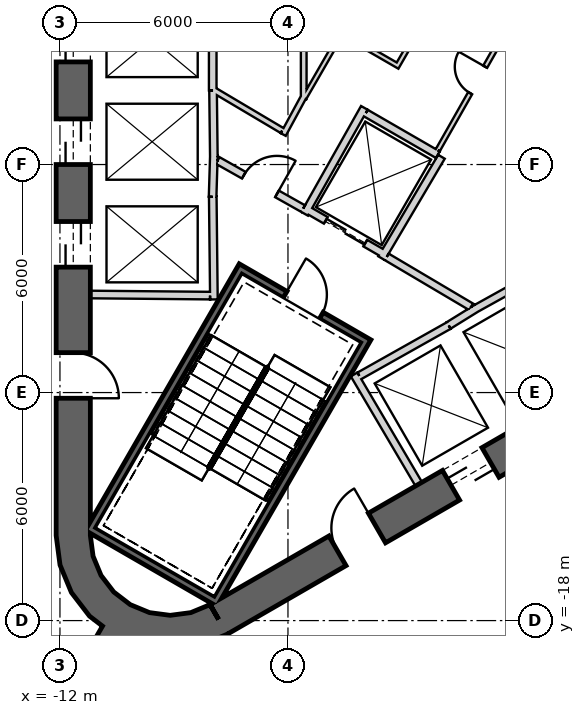
"""IFC4 building model, lengths in metres.
Left out: names, types, materials, properties, quantities, classifications, styles, units other than length and angle.
Written with IfcOpenShell. Run it as: python <this file> out.ifc"""

import sys

from ifc_helpers import new_model, si_unit, direction, frame, frame_2d, origin, place, context, subcontext, project, spatial, polyline, rectangle, outline, extrude, element, fill, save


model = new_model("IFC4")
c1 = context("Model", 3, precision=1e-05, world=origin(), true_north=direction((0.0, 1.0)))
c2 = subcontext(c1, "Body", "Model", "MODEL_VIEW")
j1 = project(units=[si_unit("LENGTHUNIT", "METRE"), si_unit("PLANEANGLEUNIT", "RADIAN")], contexts=[c1])
p1 = place(None, origin())
s1 = spatial("IfcSite", under=j1, at=p1, CompositionType="ELEMENT")
p2 = place(p1, origin())
s2 = spatial("IfcBuilding", under=s1, at=p2, CompositionType="ELEMENT")
p3 = place(p2, frame((0.0, 0.0, 277.2)))
s3 = spatial("IfcBuildingStorey", under=s2, at=p3, CompositionType="ELEMENT", Elevation=277.2)
p4 = place(p3, frame((-11.65, 15.762, 0.0), z_axis=(0.0, 0.0, 1.0), x_axis=(0.0, -1.0, 0.0)))
e1 = element("IfcWall", 1, at=p4, inside=s3, PredefinedType="SHEAR", context=c2, shape_type="SweptSolid", body=[
    extrude(rectangle(XDim=31.523, YDim=0.9, at=frame_2d((15.762, 0.0))), origin(), (0.0, 0.0, 1.0), 6.5),
])
p5 = place(p4, frame((7.062, 0.0, 0.0)))
e2 = element("IfcOpeningElement", 2, at=p5, cuts=e1, PredefinedType="OPENING", context=c2, shape_type="SweptSolid", body=[
    extrude(rectangle(XDim=1.2, YDim=2.4, at=frame_2d((0.6, 1.2))), frame((0.0, 0.46, 0.0), z_axis=(0.0, -1.0, 0.0), x_axis=(1.0, 0.0, 0.0)), (0.0, 0.0, 1.0), 0.92),
])
p6 = place(p4, frame((9.762, 0.0, 0.0)))
e3 = element("IfcOpeningElement", 3, at=p6, cuts=e1, PredefinedType="OPENING", context=c2, shape_type="SweptSolid", body=[
    extrude(rectangle(XDim=1.2, YDim=2.4, at=frame_2d((0.6, 1.2))), frame((0.0, 0.46, 0.0), z_axis=(0.0, -1.0, 0.0), x_axis=(1.0, 0.0, 0.0)), (0.0, 0.0, 1.0), 0.92),
])
p7 = place(p4, frame((12.462, 0.0, 0.0)))
e4 = element("IfcOpeningElement", 4, at=p7, cuts=e1, PredefinedType="OPENING", context=c2, shape_type="SweptSolid", body=[
    extrude(rectangle(XDim=1.2, YDim=2.4, at=frame_2d((0.6, 1.2))), frame((0.0, 0.46, 0.0), z_axis=(0.0, -1.0, 0.0), x_axis=(1.0, 0.0, 0.0)), (0.0, 0.0, 1.0), 0.92),
])
p8 = place(p4, frame((15.162, 0.0, 0.0)))
e5 = element("IfcOpeningElement", 5, at=p8, cuts=e1, PredefinedType="OPENING", context=c2, shape_type="SweptSolid", body=[
    extrude(rectangle(XDim=1.2, YDim=2.4, at=frame_2d((0.6, 1.2))), frame((0.0, 0.46, 0.0), z_axis=(0.0, -1.0, 0.0), x_axis=(1.0, 0.0, 0.0)), (0.0, 0.0, 1.0), 0.92),
])
p9 = place(p4, frame((17.862, 0.0, 0.0)))
e6 = element("IfcOpeningElement", 6, at=p9, cuts=e1, PredefinedType="OPENING", context=c2, shape_type="SweptSolid", body=[
    extrude(rectangle(XDim=1.2, YDim=2.4, at=frame_2d((0.6, 1.2))), frame((0.0, 0.46, 0.0), z_axis=(0.0, -1.0, 0.0), x_axis=(1.0, 0.0, 0.0)), (0.0, 0.0, 1.0), 0.92),
])
p10 = place(p4, frame((20.562, 0.0, 0.0)))
e7 = element("IfcOpeningElement", 7, at=p10, cuts=e1, PredefinedType="OPENING", context=c2, shape_type="SweptSolid", body=[
    extrude(rectangle(XDim=1.2, YDim=2.4, at=frame_2d((0.6, 1.2))), frame((0.0, 0.46, 0.0), z_axis=(0.0, -1.0, 0.0), x_axis=(1.0, 0.0, 0.0)), (0.0, 0.0, 1.0), 0.92),
])
p11 = place(p4, frame((23.262, 0.0, 0.0)))
e8 = element("IfcOpeningElement", 8, at=p11, cuts=e1, PredefinedType="OPENING", context=c2, shape_type="SweptSolid", body=[
    extrude(rectangle(XDim=1.2, YDim=2.4, at=frame_2d((0.6, 1.2))), frame((0.0, 0.46, 0.0), z_axis=(0.0, -1.0, 0.0), x_axis=(1.0, 0.0, 0.0)), (0.0, 0.0, 1.0), 0.92),
])
p12 = place(p4, frame((3.612, 0.0, 0.0)))
e9 = element("IfcOpeningElement", 9, at=p12, cuts=e1, PredefinedType="OPENING", context=c2, shape_type="SweptSolid", body=[
    extrude(rectangle(XDim=1.2, YDim=2.4, at=frame_2d((0.6, 1.2))), frame((0.0, 0.46, 0.0), z_axis=(0.0, -1.0, 0.0), x_axis=(1.0, 0.0, 0.0)), (0.0, 0.0, 1.0), 0.92),
])
p13 = place(p4, frame((26.712, 0.0, 0.0)))
e10 = element("IfcOpeningElement", 10, at=p13, cuts=e1, PredefinedType="OPENING", context=c2, shape_type="SweptSolid", body=[
    extrude(rectangle(XDim=1.2, YDim=2.4, at=frame_2d((0.6, 1.2))), frame((0.0, 0.46, 0.0), z_axis=(0.0, -1.0, 0.0), x_axis=(1.0, 0.0, 0.0)), (0.0, 0.0, 1.0), 0.92),
])
p14 = place(p3, frame((-7.825, -17.97, 0.0), z_axis=(0.0, 0.0, 1.0), x_axis=(0.866028369851, 0.499994862586, 0.0)))
e11 = element("IfcWall", 11, at=p14, inside=s3, PredefinedType="SHEAR", context=c2, shape_type="SweptSolid", body=[
    extrude(rectangle(XDim=31.523, YDim=0.9, at=frame_2d((15.762, 0.0))), origin(), (0.0, 0.0, 1.0), 6.5),
])
p15 = place(p14, frame((7.062, 0.0, 0.0)))
e12 = element("IfcOpeningElement", 12, at=p15, cuts=e11, PredefinedType="OPENING", context=c2, shape_type="SweptSolid", body=[
    extrude(rectangle(XDim=1.2, YDim=2.4, at=frame_2d((0.6, 1.2))), frame((0.0, 0.46, 0.0), z_axis=(0.0, -1.0, 0.0), x_axis=(1.0, 0.0, 0.0)), (0.0, 0.0, 1.0), 0.92),
])
p16 = place(p14, frame((9.762, 0.0, 0.0)))
e13 = element("IfcOpeningElement", 13, at=p16, cuts=e11, PredefinedType="OPENING", context=c2, shape_type="SweptSolid", body=[
    extrude(rectangle(XDim=1.2, YDim=2.4, at=frame_2d((0.6, 1.2))), frame((0.0, 0.46, 0.0), z_axis=(0.0, -1.0, 0.0), x_axis=(1.0, 0.0, 0.0)), (0.0, 0.0, 1.0), 0.92),
])
p17 = place(p14, frame((12.462, 0.0, 0.0)))
e14 = element("IfcOpeningElement", 14, at=p17, cuts=e11, PredefinedType="OPENING", context=c2, shape_type="SweptSolid", body=[
    extrude(rectangle(XDim=1.2, YDim=2.4, at=frame_2d((0.6, 1.2))), frame((0.0, 0.46, 0.0), z_axis=(0.0, -1.0, 0.0), x_axis=(1.0, 0.0, 0.0)), (0.0, 0.0, 1.0), 0.92),
])
p18 = place(p14, frame((15.162, 0.0, 0.0)))
e15 = element("IfcOpeningElement", 15, at=p18, cuts=e11, PredefinedType="OPENING", context=c2, shape_type="SweptSolid", body=[
    extrude(rectangle(XDim=1.2, YDim=2.4, at=frame_2d((0.6, 1.2))), frame((0.0, 0.46, 0.0), z_axis=(0.0, -1.0, 0.0), x_axis=(1.0, 0.0, 0.0)), (0.0, 0.0, 1.0), 0.92),
])
p19 = place(p14, frame((17.862, 0.0, 0.0)))
e16 = element("IfcOpeningElement", 16, at=p19, cuts=e11, PredefinedType="OPENING", context=c2, shape_type="SweptSolid", body=[
    extrude(rectangle(XDim=1.2, YDim=2.4, at=frame_2d((0.6, 1.2))), frame((0.0, 0.46, 0.0), z_axis=(0.0, -1.0, 0.0), x_axis=(1.0, 0.0, 0.0)), (0.0, 0.0, 1.0), 0.92),
])
p20 = place(p14, frame((20.562, 0.0, 0.0)))
e17 = element("IfcOpeningElement", 17, at=p20, cuts=e11, PredefinedType="OPENING", context=c2, shape_type="SweptSolid", body=[
    extrude(rectangle(XDim=1.2, YDim=2.4, at=frame_2d((0.6, 1.2))), frame((0.0, 0.46, 0.0), z_axis=(0.0, -1.0, 0.0), x_axis=(1.0, 0.0, 0.0)), (0.0, 0.0, 1.0), 0.92),
])
p21 = place(p14, frame((26.712, 0.0, 0.0)))
e18 = element("IfcOpeningElement", 18, at=p21, cuts=e11, PredefinedType="OPENING", context=c2, shape_type="SweptSolid", body=[
    extrude(rectangle(XDim=1.2, YDim=2.4, at=frame_2d((0.6, 1.2))), frame((0.0, 0.46, 0.0), z_axis=(0.0, -1.0, 0.0), x_axis=(1.0, 0.0, 0.0)), (0.0, 0.0, 1.0), 0.92),
])
p22 = place(p14, frame((3.612, 0.0, 0.0)))
e19 = element("IfcOpeningElement", 19, at=p22, cuts=e11, PredefinedType="OPENING", context=c2, shape_type="SweptSolid", body=[
    extrude(rectangle(XDim=1.2, YDim=2.4, at=frame_2d((0.6, 1.2))), frame((0.0, 0.46, 0.0), z_axis=(0.0, -1.0, 0.0), x_axis=(1.0, 0.0, 0.0)), (0.0, 0.0, 1.0), 0.92),
])
p23 = place(p3, origin())
e20 = element("IfcWall", 20, at=p23, inside=s3, PredefinedType="SHEAR", context=c2, shape_type="SweptSolid", body=[
    extrude(outline(polyline([(-12.1, -15.762), (-11.998, -16.538), (-11.698, -17.262), (-11.221, -17.883), (-10.6, -18.36), (-9.876, -18.659), (-9.1, -18.762), (-8.323, -18.659), (-7.6, -18.36), (-8.05, -17.58), (-8.556, -17.79), (-9.1, -17.862), (-9.644, -17.79), (-10.15, -17.58), (-10.585, -17.247), (-10.919, -16.812), (-11.128, -16.305), (-11.2, -15.762), (-12.1, -15.762)])), origin(), (0.0, 0.0, 1.0), 6.5),
])
p24 = place(p3, frame((-10.575, -18.316, 0.0), z_axis=(0.0, 0.0, 1.0), x_axis=(-0.500007350791, -0.866021159762, 0.0)))
e21 = element("IfcWall", 21, at=p24, inside=s3, PredefinedType="SHEAR", context=c2, shape_type="SweptSolid", body=[
    extrude(rectangle(XDim=9.965, YDim=0.7, at=frame_2d((4.982, 0.0))), origin(), (0.0, 0.0, 1.0), 6.5),
])
p25 = place(p24, frame((2.05, 0.0, 0.0)))
e22 = element("IfcOpeningElement", 22, at=p25, cuts=e21, PredefinedType="OPENING", context=c2, shape_type="SweptSolid", body=[
    extrude(rectangle(XDim=1.4, YDim=2.4, at=frame_2d((0.7, 1.2))), frame((0.0, 0.36, 0.0), z_axis=(0.0, -1.0, 0.0), x_axis=(1.0, 0.0, 0.0)), (0.0, 0.0, 1.0), 0.72),
])
p26 = place(p3, frame((-7.98, 4.05, 0.0), z_axis=(0.0, 0.0, 1.0), x_axis=(0.0, -1.0, 0.0)))
e23 = element("IfcWall", 23, at=p26, inside=s3, PredefinedType="PLUMBINGWALL", context=c2, shape_type="SweptSolid", body=[
    extrude(rectangle(XDim=8.1, YDim=0.2, at=frame_2d((4.05, 0.0))), origin(), (0.0, 0.0, 1.0), 6.1),
])
p27 = place(p3, frame((-7.95, -5.772, 0.0), z_axis=(0.0, 0.0, 1.0), x_axis=(-0.030803413295, -0.999525462272, 0.0)))
e24 = element("IfcWall", 24, at=p27, inside=s3, PredefinedType="PLUMBINGWALL", context=c2, shape_type="SweptSolid", body=[
    extrude(rectangle(XDim=1.078, YDim=0.2, at=frame_2d((0.539, 0.0))), origin(), (0.0, 0.0, 1.0), 6.1),
])
p28 = place(p3, frame((-7.971, -4.05, 0.0), z_axis=(0.0, 0.0, 1.0), x_axis=(0.012042535896, -0.999927486035, 0.0)))
e25 = element("IfcWall", 25, at=p28, inside=s3, PredefinedType="PLUMBINGWALL", context=c2, shape_type="SweptSolid", body=[
    extrude(rectangle(XDim=1.845, YDim=0.2, at=frame_2d((0.922, 0.0))), origin(), (0.0, 0.0, 1.0), 6.1),
])
p29 = place(p3, frame((-7.979, -6.85, 0.0), z_axis=(0.0, 0.0, 1.0), x_axis=(0.011121475088, -0.999938154483, 0.0)))
e26 = element("IfcWall", 26, at=p29, inside=s3, PredefinedType="PLUMBINGWALL", context=c2, shape_type="SweptSolid", body=[
    extrude(rectangle(XDim=2.7, YDim=0.2, at=frame_2d((1.35, 0.0))), origin(), (0.0, 0.0, 1.0), 6.1),
])
p30 = place(p3, frame((-8.05, -9.449, 0.0), z_axis=(0.0, 0.0, 1.0), x_axis=(-0.999957467379, 0.009222983926, 0.0)))
e27 = element("IfcWall", 27, at=p30, inside=s3, PredefinedType="PLUMBINGWALL", context=c2, shape_type="SweptSolid", body=[
    extrude(rectangle(XDim=3.15, YDim=0.2, at=frame_2d((1.575, 0.0))), origin(), (0.0, 0.0, 1.0), 6.1),
])
p31 = place(p3, frame((-2.558, -14.409, 0.0), z_axis=(0.0, 0.0, 1.0), x_axis=(-0.507997497166, 0.861358544901, 0.0)))
e28 = element("IfcWall", 28, at=p31, inside=s3, PredefinedType="PLUMBINGWALL", context=c2, shape_type="SweptSolid", body=[
    extrude(rectangle(XDim=3.35, YDim=0.2, at=frame_2d((1.675, 0.0))), origin(), (0.0, 0.0, 1.0), 6.1),
])
p32 = place(p3, frame((-1.769, -10.237, 0.0), z_axis=(0.0, 0.0, 1.0), x_axis=(-0.871534483978, -0.490334215854, 0.0)))
e29 = element("IfcWall", 29, at=p32, inside=s3, PredefinedType="PLUMBINGWALL", context=c2, shape_type="SweptSolid", body=[
    extrude(rectangle(XDim=2.7, YDim=0.2, at=frame_2d((1.35, 0.0))), origin(), (0.0, 0.0, 1.0), 6.1),
])
p33 = place(p3, frame((-1.024, -9.771, 0.0), z_axis=(0.0, 0.0, 1.0), x_axis=(-0.850348075135, -0.526220629693, 0.0)))
e30 = element("IfcWall", 30, at=p33, inside=s3, PredefinedType="PLUMBINGWALL", context=c2, shape_type="SweptSolid", body=[
    extrude(rectangle(XDim=0.878, YDim=0.2, at=frame_2d((0.439, 0.0))), origin(), (0.0, 0.0, 1.0), 6.1),
])
p34 = place(p3, frame((-1.13, -9.831, 0.0), z_axis=(0.0, 0.0, 1.0), x_axis=(0.874269620932, 0.485440655401, 0.0)))
e31 = element("IfcWall", 31, at=p34, inside=s3, PredefinedType="PLUMBINGWALL", context=c2, shape_type="SweptSolid", body=[
    extrude(rectangle(XDim=1.845, YDim=0.2, at=frame_2d((0.922, 0.0))), origin(), (0.0, 0.0, 1.0), 6.1),
])
p35 = place(p3, frame((-3.905, -10.563, -0.35), z_axis=(0.0, 0.0, 1.0), x_axis=(-0.500012932018, -0.866017937352, 0.0)))
e32 = element("IfcWall", 32, at=p35, inside=s3, PredefinedType="SHEAR", context=c2, shape_type="SweptSolid", body=[
    extrude(rectangle(XDim=8.1, YDim=0.2, at=frame_2d((4.05, 0.0))), origin(), (0.0, 0.0, 1.0), 6.45),
])
p36 = place(p3, frame((-11.282, -15.541, -0.35), z_axis=(0.0, 0.0, 1.0), x_axis=(0.866000483506, -0.500043160704, 0.0)))
e33 = element("IfcWall", 33, at=p36, inside=s3, PredefinedType="SHEAR", context=c2, shape_type="SweptSolid", body=[
    extrude(rectangle(XDim=3.8, YDim=0.2, at=frame_2d((1.9, 0.0))), origin(), (0.0, 0.0, 1.0), 6.45),
])
p37 = place(p3, frame((-7.196, -8.663, -0.35), z_axis=(0.0, 0.0, 1.0), x_axis=(-0.499997992926, -0.866026562566, 0.0)))
e34 = element("IfcWall", 34, at=p37, inside=s3, PredefinedType="SHEAR", context=c2, shape_type="SweptSolid", body=[
    extrude(rectangle(XDim=7.9, YDim=0.2, at=frame_2d((3.95, 0.0))), origin(), (0.0, 0.0, 1.0), 6.45),
])
p38 = place(p3, frame((-4.041, -10.599, -0.35), z_axis=(0.0, 0.0, 1.0), x_axis=(-0.866047807691, 0.499961193289, 0.0)))
e35 = element("IfcWall", 35, at=p38, inside=s3, PredefinedType="SHEAR", context=c2, shape_type="SweptSolid", body=[
    extrude(rectangle(XDim=3.6, YDim=0.2, at=frame_2d((1.8, 0.0))), origin(), (0.0, 0.0, 1.0), 6.45),
])
p39 = place(p38, frame((1.25, 0.0, 0.35)))
e36 = element("IfcOpeningElement", 36, at=p39, cuts=e35, PredefinedType="OPENING", context=c2, shape_type="SweptSolid", body=[
    extrude(rectangle(XDim=1.1, YDim=2.1, at=frame_2d((0.55, 1.05))), frame((0.0, 0.11, 0.0), z_axis=(0.0, -1.0, 0.0), x_axis=(1.0, 0.0, 0.0)), (0.0, 0.0, 1.0), 0.22),
])
p40 = place(p3, frame((-3.446, -8.368, 0.0), z_axis=(0.0, 0.0, 1.0), x_axis=(-0.866024647952, 0.500001309137, 0.0)))
e37 = element("IfcWall", 37, at=p40, inside=s3, PredefinedType="PLUMBINGWALL", context=c2, shape_type="SweptSolid", body=[
    extrude(rectangle(XDim=2.4, YDim=0.2, at=frame_2d((1.2, 0.0))), origin(), (0.0, 0.0, 1.0), 6.1),
])
p41 = place(p40, frame((0.6, 0.0, 0.0)))
e38 = element("IfcOpeningElement", 38, at=p41, cuts=e37, PredefinedType="OPENING", context=c2, shape_type="SweptSolid", body=[
    extrude(rectangle(XDim=1.2, YDim=2.4, at=frame_2d((0.6, 1.2))), frame((0.0, 0.11, 0.0), z_axis=(0.0, -1.0, 0.0), x_axis=(1.0, 0.0, 0.0)), (0.0, 0.0, 1.0), 0.22),
])
p42 = place(p3, frame((-1.961, -5.796, 0.0), z_axis=(0.0, 0.0, 1.0), x_axis=(-0.508647062354, -0.860975125052, 0.0)))
e39 = element("IfcWall", 39, at=p42, inside=s3, PredefinedType="PLUMBINGWALL", context=c2, shape_type="SweptSolid", body=[
    extrude(rectangle(XDim=3.1, YDim=0.2, at=frame_2d((1.55, 0.0))), origin(), (0.0, 0.0, 1.0), 6.1),
])
p43 = place(p3, frame((-3.99, -4.509, 0.0), z_axis=(0.0, 0.0, 1.0), x_axis=(-0.491358283181, -0.870957540612, 0.0)))
e40 = element("IfcWall", 40, at=p43, inside=s3, PredefinedType="PLUMBINGWALL", context=c2, shape_type="SweptSolid", body=[
    extrude(rectangle(XDim=3.2, YDim=0.2, at=frame_2d((1.6, 0.0))), origin(), (0.0, 0.0, 1.0), 6.1),
])
p44 = place(p3, frame((-3.953, -4.646, 0.0), z_axis=(0.0, 0.0, 1.0), x_axis=(0.866038900241, -0.499976622722, 0.0)))
e41 = element("IfcWall", 41, at=p44, inside=s3, PredefinedType="PLUMBINGWALL", context=c2, shape_type="SweptSolid", body=[
    extrude(rectangle(XDim=2.189, YDim=0.2, at=frame_2d((1.095, 0.0))), origin(), (0.0, 0.0, 1.0), 6.1),
])
p45 = place(p3, frame((-3.401, -8.43, 0.0), z_axis=(0.0, 0.0, 1.0), x_axis=(0.860615607571, -0.509255118781, 0.0)))
e42 = element("IfcWall", 42, at=p45, inside=s3, PredefinedType="PARTITIONING", context=c2, shape_type="SweptSolid", body=[
    extrude(rectangle(XDim=2.581, YDim=0.2, at=frame_2d((1.29, 0.0))), origin(), (0.0, 0.0, 1.0), 6.1),
])
p46 = place(p3, frame((-7.849, -5.894, 0.0), z_axis=(0.0, 0.0, 1.0), x_axis=(0.871363259478, -0.490638431059, 0.0)))
e43 = element("IfcWall", 43, at=p46, inside=s3, PredefinedType="PARTITIONING", context=c2, shape_type="SweptSolid", body=[
    extrude(rectangle(XDim=2.581, YDim=0.2, at=frame_2d((1.291, 0.0))), origin(), (0.0, 0.0, 1.0), 6.1),
])
p47 = place(p46, frame((0.791, 0.0, 0.0)))
e44 = element("IfcOpeningElement", 44, at=p47, cuts=e43, PredefinedType="OPENING", context=c2, shape_type="SweptSolid", body=[
    extrude(rectangle(XDim=1.0, YDim=2.1, at=frame_2d((0.5, 1.05))), frame((0.0, 0.11, 0.0), z_axis=(0.0, -1.0, 0.0), x_axis=(1.0, 0.0, 0.0)), (0.0, 0.0, 1.0), 0.22),
])
p48 = place(p3, frame((0.094, -1.836, 0.0), z_axis=(0.0, 0.0, 1.0), x_axis=(-0.494097972448, -0.869406230495, 0.0)))
e45 = element("IfcWall", 45, at=p48, inside=s3, PredefinedType="PARTITIONING", context=c2, shape_type="SweptSolid", body=[
    extrude(rectangle(XDim=4.357, YDim=0.12, at=frame_2d((2.179, 0.0))), origin(), (0.0, 0.0, 1.0), 6.1),
])
p49 = place(p48, frame((1.83, 0.0, 0.0)))
e46 = element("IfcOpeningElement", 46, at=p49, cuts=e45, PredefinedType="OPENING", context=c2, shape_type="SweptSolid", body=[
    extrude(rectangle(XDim=0.8, YDim=2.1, at=frame_2d((0.4, 1.05))), frame((0.0, 0.07, 0.0), z_axis=(0.0, -1.0, 0.0), x_axis=(1.0, 0.0, 0.0)), (0.0, 0.0, 1.0), 0.14),
])
p50 = place(p3, frame((-5.586, -4.275, 0.0), z_axis=(0.0, 0.0, 1.0), x_axis=(0.0, 1.0, 0.0)))
e47 = element("IfcWall", 47, at=p50, inside=s3, PredefinedType="PLUMBINGWALL", context=c2, shape_type="SweptSolid", body=[
    extrude(rectangle(XDim=8.549, YDim=0.15, at=frame_2d((4.275, 0.0))), origin(), (0.0, 0.0, 1.0), 6.1),
])
p51 = place(p3, frame((-6.124, -5.211, 0.0), z_axis=(0.0, 0.0, 1.0), x_axis=(0.476228984866, 0.879321303036, 0.0)))
e48 = element("IfcWall", 48, at=p51, inside=s3, PredefinedType="PLUMBINGWALL", context=c2, shape_type="SweptSolid", body=[
    extrude(rectangle(XDim=1.162, YDim=0.15, at=frame_2d((0.581, 0.0))), origin(), (0.0, 0.0, 1.0), 6.1),
])
p52 = place(p3, frame((-7.95, -4.041, 0.0), z_axis=(0.0, 0.0, 1.0), x_axis=(0.860090281069, -0.510141851263, 0.0)))
e49 = element("IfcWall", 49, at=p52, inside=s3, PredefinedType="PLUMBINGWALL", context=c2, shape_type="SweptSolid", body=[
    extrude(rectangle(XDim=2.089, YDim=0.15, at=frame_2d((1.045, 0.0))), origin(), (0.0, 0.0, 1.0), 6.1),
])
p53 = place(p3, frame((-3.146, -3.449, 0.0), z_axis=(0.0, 0.0, 1.0), x_axis=(0.500028961621, 0.866008682139, 0.0)))
e50 = element("IfcWall", 50, at=p53, inside=s3, PredefinedType="PARTITIONING", context=c2, shape_type="SweptSolid", body=[
    extrude(rectangle(XDim=2.896, YDim=0.12, at=frame_2d((1.448, 0.0))), origin(), (0.0, 0.0, 1.0), 6.1),
])
p54 = place(p53, frame((1.078, 0.0, 0.0)))
e51 = element("IfcOpeningElement", 51, at=p54, cuts=e50, PredefinedType="OPENING", context=c2, shape_type="SweptSolid", body=[
    extrude(rectangle(XDim=0.8, YDim=2.1, at=frame_2d((0.4, 1.05))), frame((0.0, 0.07, 0.0), z_axis=(0.0, -1.0, 0.0), x_axis=(1.0, 0.0, 0.0)), (0.0, 0.0, 1.0), 0.14),
])
p55 = place(p3, frame((-4.64, -2.517, 0.0), z_axis=(0.0, 0.0, 1.0), x_axis=(0.865989465428, -0.500062241894, 0.0)))
e52 = element("IfcWall", 52, at=p55, inside=s3, PredefinedType="PARTITIONING", context=c2, shape_type="SweptSolid", body=[
    extrude(rectangle(XDim=1.7, YDim=0.12, at=frame_2d((0.85, 0.0))), origin(), (0.0, 0.0, 1.0), 6.1),
])
p56 = place(p3, frame((-5.571, -4.249, 0.0), z_axis=(0.0, 0.0, 1.0), x_axis=(0.500081145431, 0.865978549379, 0.0)))
e53 = element("IfcWall", 53, at=p56, inside=s3, PredefinedType="PARTITIONING", context=c2, shape_type="SweptSolid", body=[
    extrude(rectangle(XDim=1.905, YDim=0.12, at=frame_2d((0.953, 0.0))), origin(), (0.0, 0.0, 1.0), 6.1),
])
p57 = place(p3, frame((-4.595, -27.017, 0.0), z_axis=(0.0, 0.0, 1.0), x_axis=(0.866023879948, 0.500002639353, 0.0)))
e54 = element("IfcWall", 54, at=p57, inside=s3, PredefinedType="PARTITIONING", context=c2, shape_type="SweptSolid", body=[
    extrude(rectangle(XDim=26.097, YDim=0.12, at=frame_2d((13.049, 0.0))), origin(), (0.0, 0.0, 1.0), 6.1),
])
p58 = place(p57, frame((19.96, 0.0, 0.0)))
e55 = element("IfcOpeningElement", 55, at=p58, cuts=e54, PredefinedType="OPENING", context=c2, shape_type="SweptSolid", body=[
    extrude(rectangle(XDim=1.8, YDim=2.1, at=frame_2d((0.9, 1.05))), frame((0.0, 0.07, 0.0), z_axis=(0.0, -1.0, 0.0), x_axis=(1.0, 0.0, 0.0)), (0.0, 0.0, 1.0), 0.14),
])
p59 = place(p39, origin())
e56 = element("IfcDoor", 56, at=p59, inside=s3, OperationType="SINGLE_SWING_RIGHT", PredefinedType="USERDEFINED", context=c2, shape_type="SweptSolid", body=[
    extrude(rectangle(XDim=1.1, YDim=2.1, at=frame_2d((0.55, 1.05))), frame((0.0, 0.025, 0.0), z_axis=(0.0, -1.0, 0.0), x_axis=(1.0, 0.0, 0.0)), (0.0, 0.0, 1.0), 0.05),
])
fill(e36, e56)
p60 = place(p47, origin())
e57 = element("IfcDoor", 57, at=p60, inside=s3, OperationType="SINGLE_SWING_RIGHT", PredefinedType="USERDEFINED", context=c2, shape_type="SweptSolid", body=[
    extrude(rectangle(XDim=1.0, YDim=2.1, at=frame_2d((0.5, 1.05))), frame((0.0, 0.025, 0.0), z_axis=(0.0, -1.0, 0.0), x_axis=(1.0, 0.0, 0.0)), (0.0, 0.0, 1.0), 0.05),
])
fill(e44, e57)
p61 = place(p41, origin())
e58 = element("IfcDoor", 58, at=p61, inside=s3, OperationType="SLIDING_TO_LEFT", PredefinedType="USERDEFINED", context=c2, shape_type="SweptSolid", body=[
    extrude(rectangle(XDim=1.2, YDim=2.4, at=frame_2d((0.6, 1.2))), frame((0.0, 0.025, 0.0), z_axis=(0.0, -1.0, 0.0), x_axis=(1.0, 0.0, 0.0)), (0.0, 0.0, 1.0), 0.05),
])
fill(e38, e58)
p62 = place(p49, origin())
e59 = element("IfcDoor", 59, at=p62, inside=s3, OperationType="SINGLE_SWING_LEFT", PredefinedType="USERDEFINED", context=c2, shape_type="SweptSolid", body=[
    extrude(rectangle(XDim=0.8, YDim=2.1, at=frame_2d((0.4, 1.05))), frame((0.0, 0.025, 0.0), z_axis=(0.0, -1.0, 0.0), x_axis=(1.0, 0.0, 0.0)), (0.0, 0.0, 1.0), 0.05),
])
fill(e46, e59)
p63 = place(p9, origin())
e60 = element("IfcDoor", 60, at=p63, inside=s3, OperationType="SLIDING_TO_LEFT", PredefinedType="USERDEFINED", context=c2, shape_type="SweptSolid", body=[
    extrude(rectangle(XDim=1.2, YDim=2.4, at=frame_2d((0.6, 1.2))), frame((0.0, 0.025, 0.0), z_axis=(0.0, -1.0, 0.0), x_axis=(1.0, 0.0, 0.0)), (0.0, 0.0, 1.0), 0.05),
])
fill(e6, e60)
p64 = place(p10, origin())
e61 = element("IfcDoor", 61, at=p64, inside=s3, OperationType="SLIDING_TO_LEFT", PredefinedType="USERDEFINED", context=c2, shape_type="SweptSolid", body=[
    extrude(rectangle(XDim=1.2, YDim=2.4, at=frame_2d((0.6, 1.2))), frame((0.0, 0.025, 0.0), z_axis=(0.0, -1.0, 0.0), x_axis=(1.0, 0.0, 0.0)), (0.0, 0.0, 1.0), 0.05),
])
fill(e7, e61)
p65 = place(p11, origin())
e62 = element("IfcDoor", 62, at=p65, inside=s3, OperationType="SLIDING_TO_LEFT", PredefinedType="USERDEFINED", context=c2, shape_type="SweptSolid", body=[
    extrude(rectangle(XDim=1.2, YDim=2.4, at=frame_2d((0.6, 1.2))), frame((0.0, 0.025, 0.0), z_axis=(0.0, -1.0, 0.0), x_axis=(1.0, 0.0, 0.0)), (0.0, 0.0, 1.0), 0.05),
])
fill(e8, e62)
p66 = place(p15, origin())
e63 = element("IfcDoor", 63, at=p66, inside=s3, OperationType="SLIDING_TO_LEFT", PredefinedType="USERDEFINED", context=c2, shape_type="SweptSolid", body=[
    extrude(rectangle(XDim=1.2, YDim=2.4, at=frame_2d((0.6, 1.2))), frame((0.0, 0.025, 0.0), z_axis=(0.0, -1.0, 0.0), x_axis=(1.0, 0.0, 0.0)), (0.0, 0.0, 1.0), 0.05),
])
fill(e12, e63)
p67 = place(p13, origin())
e64 = element("IfcDoor", 64, at=p67, inside=s3, OperationType="SINGLE_SWING_RIGHT", PredefinedType="USERDEFINED", context=c2, shape_type="SweptSolid", body=[
    extrude(rectangle(XDim=1.2, YDim=2.4, at=frame_2d((0.6, 1.2))), frame((0.0, 0.025, 0.0), z_axis=(0.0, -1.0, 0.0), x_axis=(1.0, 0.0, 0.0)), (0.0, 0.0, 1.0), 0.05),
])
fill(e10, e64)
p68 = place(p22, origin())
e65 = element("IfcDoor", 65, at=p68, inside=s3, OperationType="SINGLE_SWING_RIGHT", PredefinedType="USERDEFINED", context=c2, shape_type="SweptSolid", body=[
    extrude(rectangle(XDim=1.2, YDim=2.4, at=frame_2d((0.6, 1.2))), frame((0.0, 0.025, 0.0), z_axis=(0.0, -1.0, 0.0), x_axis=(1.0, 0.0, 0.0)), (0.0, 0.0, 1.0), 0.05),
])
fill(e19, e65)
save(model, sys.argv[1])
